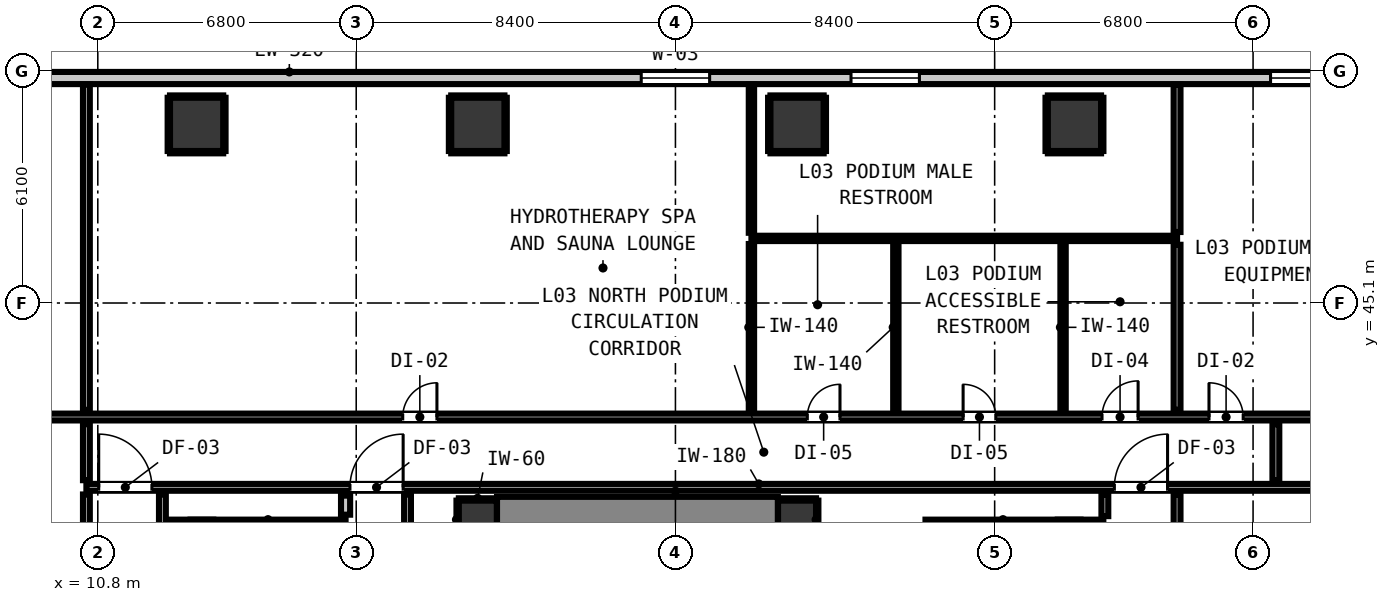
"""IFC4 building model, lengths in metres.
Left out: names, types, materials, properties, quantities, classifications, styles, units other than length and angle.
Written with IfcOpenShell. Run it as: python <this file> out.ifc"""

import sys

from ifc_helpers import new_model, si_unit, direction, frame, frame_2d, origin, origin_2d, place, context, subcontext, project, spatial, rectangle, extrude, element, fill, save


model = new_model("IFC4")
c1 = context("Model", 3, precision=1e-05, world=origin(), true_north=direction((0.0, 1.0)))
c2 = subcontext(c1, "Body", "Model", "MODEL_VIEW")
j1 = project(units=[si_unit("LENGTHUNIT", "METRE"), si_unit("PLANEANGLEUNIT", "RADIAN")], contexts=[c1])
p1 = place(None, origin())
s1 = spatial("IfcSite", under=j1, at=p1, CompositionType="ELEMENT")
p2 = place(p1, origin())
s2 = spatial("IfcBuilding", under=s1, at=p2, CompositionType="ELEMENT")
p3 = place(p2, frame((0.0, 0.0, 13.6)))
s3 = spatial("IfcBuildingStorey", under=s2, at=p3, CompositionType="ELEMENT", Elevation=13.6)
for number, where, z_axis, x_axis in (
    (1, (20.8, 39.4, 0.0), (0.0, 0.0, 1.0), (1.0, 0.0, 0.0)),
    (2, (29.2, 39.4, 0.0), (0.0, 0.0, 1.0), (1.0, 0.0, 0.0)),
):
    element("IfcColumn", number, at=place(p3, frame(where, z_axis=z_axis, x_axis=x_axis)), inside=s3, PredefinedType="COLUMN", context=c2, shape_type="SweptSolid", body=[
        extrude(rectangle(XDim=1.0, YDim=1.0, at=origin_2d()), origin(), (0.0, 0.0, 1.0), 4.2),
    ])
p4 = place(p3, frame((13.24, 31.205, 0.0), z_axis=(0.0, 0.0, 1.0), x_axis=(0.0, 1.0, 0.0)))
e3 = element("IfcWall", 3, at=p4, inside=s3, PredefinedType="SHEAR", context=c2, shape_type="SweptSolid", body=[
    extrude(rectangle(XDim=8.195, YDim=1.2, at=frame_2d((4.097, 0.0))), origin(), (0.0, 0.0, 1.0), 4.2),
])
p5 = place(p3, frame((13.24, 39.1, 0.0), z_axis=(0.0, 0.0, 1.0), x_axis=(1.0, 0.0, 0.0)))
e4 = element("IfcWall", 4, at=p5, inside=s3, PredefinedType="SHEAR", context=c2, shape_type="SweptSolid", body=[
    extrude(rectangle(XDim=4.08, YDim=0.6, at=frame_2d((2.04, 0.0))), origin(), (0.0, 0.0, 1.0), 4.2),
])
p6 = place(p3, frame((36.66, 31.205, 0.0), z_axis=(0.0, 0.0, 1.0), x_axis=(0.0, 1.0, 0.0)))
e5 = element("IfcWall", 5, at=p6, inside=s3, PredefinedType="SHEAR", context=c2, shape_type="SweptSolid", body=[
    extrude(rectangle(XDim=8.195, YDim=1.2, at=frame_2d((4.097, 0.0))), origin(), (0.0, 0.0, 1.0), 4.2),
])
p7 = place(p3, frame((32.58, 39.1, 0.0), z_axis=(0.0, 0.0, 1.0), x_axis=(1.0, 0.0, 0.0)))
e6 = element("IfcWall", 6, at=p7, inside=s3, PredefinedType="SHEAR", context=c2, shape_type="SweptSolid", body=[
    extrude(rectangle(XDim=4.08, YDim=0.6, at=frame_2d((2.04, 0.0))), origin(), (0.0, 0.0, 1.0), 4.2),
])
p8 = place(p3, frame((21.305, 39.4, 0.0), z_axis=(0.0, 0.0, 1.0), x_axis=(1.0, 0.0, 0.0)))
e7 = element("IfcWall", 7, at=p8, inside=s3, PredefinedType="SHEAR", context=c2, shape_type="SweptSolid", body=[
    extrude(rectangle(XDim=7.39, YDim=1.2, at=frame_2d((3.695, 0.0))), origin(), (0.0, 0.0, 1.0), 4.2),
])
for number, where, z_axis, x_axis in (
    (8, (13.4, 49.8, 0.0), (0.0, 0.0, 1.0), (1.0, 0.0, 0.0)),
    (9, (20.8, 49.8, 0.0), (0.0, 0.0, 1.0), (1.0, 0.0, 0.0)),
    (10, (29.2, 49.8, 0.0), (0.0, 0.0, 1.0), (1.0, 0.0, 0.0)),
    (11, (36.5, 49.8, 0.0), (0.0, 0.0, 1.0), (1.0, 0.0, 0.0)),
):
    element("IfcColumn", number, at=place(p3, frame(where, z_axis=z_axis, x_axis=x_axis)), inside=s3, PredefinedType="COLUMN", context=c2, shape_type="SweptSolid", body=[
        extrude(rectangle(XDim=1.4, YDim=1.4, at=origin_2d()), origin(), (0.0, 0.0, 1.0), 4.2),
    ])
p9 = place(p3, frame((6.68, 51.02, 0.0), z_axis=(0.0, 0.0, 1.0), x_axis=(1.0, 0.0, 0.0)))
e12 = element("IfcWall", 12, at=p9, inside=s3, PredefinedType="STANDARD", context=c2, shape_type="SweptSolid", body=[
    extrude(rectangle(XDim=38.64, YDim=0.32, at=frame_2d((19.32, 0.0))), origin(), (0.0, 0.0, 1.0), 3.78),
])
p10 = place(p9, frame((18.42, 0.0, 0.9)))
e13 = element("IfcOpeningElement", 13, at=p10, cuts=e12, PredefinedType="OPENING", context=c2, shape_type="SweptSolid", body=[
    extrude(rectangle(XDim=1.8, YDim=1.9, at=frame_2d((0.9, 0.95))), frame((0.0, 0.17, 0.0), z_axis=(0.0, -1.0, 0.0), x_axis=(1.0, 0.0, 0.0)), (0.0, 0.0, 1.0), 0.34),
])
p11 = place(p9, frame((23.94, 0.0, 0.9)))
e14 = element("IfcOpeningElement", 14, at=p11, cuts=e12, PredefinedType="OPENING", context=c2, shape_type="SweptSolid", body=[
    extrude(rectangle(XDim=1.8, YDim=1.9, at=frame_2d((0.9, 0.95))), frame((0.0, 0.17, 0.0), z_axis=(0.0, -1.0, 0.0), x_axis=(1.0, 0.0, 0.0)), (0.0, 0.0, 1.0), 0.34),
])
p12 = place(p9, frame((34.98, 0.0, 0.9)))
e15 = element("IfcOpeningElement", 15, at=p12, cuts=e12, PredefinedType="OPENING", context=c2, shape_type="SweptSolid", body=[
    extrude(rectangle(XDim=1.8, YDim=1.9, at=frame_2d((0.9, 0.95))), frame((0.0, 0.17, 0.0), z_axis=(0.0, -1.0, 0.0), x_axis=(1.0, 0.0, 0.0)), (0.0, 0.0, 1.0), 0.34),
])
p13 = place(p3, frame((10.5, 40.25, 0.0), z_axis=(0.0, 0.0, 1.0), x_axis=(1.0, 0.0, 0.0)))
e16 = element("IfcWall", 16, at=p13, inside=s3, PredefinedType="PARTITIONING", context=c2, shape_type="SweptSolid", body=[
    extrude(rectangle(XDim=37.2, YDim=0.18, at=frame_2d((18.6, 0.0))), origin(), (0.0, 0.0, 1.0), 3.78),
])
p14 = place(p13, frame((6.935, 0.0, 0.0)))
e17 = element("IfcOpeningElement", 17, at=p14, cuts=e16, PredefinedType="OPENING", context=c2, shape_type="SweptSolid", body=[
    extrude(rectangle(XDim=1.4, YDim=2.15, at=frame_2d((0.7, 1.075))), frame((0.0, 0.1, 0.0), z_axis=(0.0, -1.0, 0.0), x_axis=(1.0, 0.0, 0.0)), (0.0, 0.0, 1.0), 0.2),
])
p15 = place(p13, frame((0.324, 0.0, 0.0)))
e18 = element("IfcOpeningElement", 18, at=p15, cuts=e16, PredefinedType="OPENING", context=c2, shape_type="SweptSolid", body=[
    extrude(rectangle(XDim=1.4, YDim=2.15, at=frame_2d((0.7, 1.075))), frame((0.0, 0.1, 0.0), z_axis=(0.0, -1.0, 0.0), x_axis=(1.0, 0.0, 0.0)), (0.0, 0.0, 1.0), 0.2),
])
p16 = place(p13, frame((27.05, 0.0, 0.0)))
e19 = element("IfcOpeningElement", 19, at=p16, cuts=e16, PredefinedType="OPENING", context=c2, shape_type="SweptSolid", body=[
    extrude(rectangle(XDim=1.4, YDim=2.15, at=frame_2d((0.7, 1.075))), frame((0.0, 0.1, 0.0), z_axis=(0.0, -1.0, 0.0), x_axis=(1.0, 0.0, 0.0)), (0.0, 0.0, 1.0), 0.2),
])
p17 = place(p3, frame((4.352, 42.1, 0.0), z_axis=(0.0, 0.0, 1.0), x_axis=(1.0, 0.0, 0.0)))
e20 = element("IfcWall", 20, at=p17, inside=s3, PredefinedType="PARTITIONING", context=c2, shape_type="SweptSolid", body=[
    extrude(rectangle(XDim=43.296, YDim=0.18, at=frame_2d((21.648, 0.0))), origin(), (0.0, 0.0, 1.0), 3.78),
])
p18 = place(p17, frame((14.472, 0.0, 0.0)))
e21 = element("IfcOpeningElement", 21, at=p18, cuts=e20, PredefinedType="OPENING", context=c2, shape_type="SweptSolid", body=[
    extrude(rectangle(XDim=0.9, YDim=2.1, at=frame_2d((0.45, 1.05))), frame((0.0, 0.1, 0.0), z_axis=(0.0, -1.0, 0.0), x_axis=(1.0, 0.0, 0.0)), (0.0, 0.0, 1.0), 0.2),
])
p19 = place(p17, frame((25.118, 0.0, 0.0)))
e22 = element("IfcOpeningElement", 22, at=p19, cuts=e20, PredefinedType="OPENING", context=c2, shape_type="SweptSolid", body=[
    extrude(rectangle(XDim=0.86, YDim=2.02, at=frame_2d((0.43, 1.01))), frame((0.0, 0.1, 0.0), z_axis=(0.0, -1.0, 0.0), x_axis=(1.0, 0.0, 0.0)), (0.0, 0.0, 1.0), 0.2),
])
p20 = place(p17, frame((29.218, 0.0, 0.0)))
e23 = element("IfcOpeningElement", 23, at=p20, cuts=e20, PredefinedType="OPENING", context=c2, shape_type="SweptSolid", body=[
    extrude(rectangle(XDim=0.86, YDim=2.02, at=frame_2d((0.43, 1.01))), frame((0.0, 0.1, 0.0), z_axis=(0.0, -1.0, 0.0), x_axis=(1.0, 0.0, 0.0)), (0.0, 0.0, 1.0), 0.2),
])
p21 = place(p17, frame((32.873, 0.0, 0.0)))
e24 = element("IfcOpeningElement", 24, at=p21, cuts=e20, PredefinedType="OPENING", context=c2, shape_type="SweptSolid", body=[
    extrude(rectangle(XDim=0.95, YDim=2.1, at=frame_2d((0.475, 1.05))), frame((0.0, 0.1, 0.0), z_axis=(0.0, -1.0, 0.0), x_axis=(1.0, 0.0, 0.0)), (0.0, 0.0, 1.0), 0.2),
])
p22 = place(p17, frame((35.688, 0.0, 0.0)))
e25 = element("IfcOpeningElement", 25, at=p22, cuts=e20, PredefinedType="OPENING", context=c2, shape_type="SweptSolid", body=[
    extrude(rectangle(XDim=0.9, YDim=2.1, at=frame_2d((0.45, 1.05))), frame((0.0, 0.1, 0.0), z_axis=(0.0, -1.0, 0.0), x_axis=(1.0, 0.0, 0.0)), (0.0, 0.0, 1.0), 0.2),
])
p23 = place(p3, frame((28.0, 46.8, 0.0), z_axis=(0.0, 0.0, 1.0), x_axis=(1.0, 0.0, 0.0)))
e26 = element("IfcWall", 26, at=p23, inside=s3, PredefinedType="PARTITIONING", context=c2, shape_type="SweptSolid", body=[
    extrude(rectangle(XDim=11.2, YDim=0.14, at=frame_2d((5.6, 0.0))), origin(), (0.0, 0.0, 1.0), 3.78),
])
p24 = place(p3, frame((17.32, 39.53, 0.0), z_axis=(0.0, 0.0, 1.0), x_axis=(0.0, 1.0, 0.0)))
e27 = element("IfcWall", 27, at=p24, inside=s3, PredefinedType="PARTITIONING", context=c2, shape_type="SweptSolid", body=[
    extrude(rectangle(XDim=0.502, YDim=0.24, at=frame_2d((0.251, 0.0))), origin(), (0.0, 0.0, 1.0), 3.78),
])
p25 = place(p3, frame((10.5, 21.368, 0.0), z_axis=(0.0, 0.0, 1.0), x_axis=(0.0, 1.0, 0.0)))
e28 = element("IfcWall", 28, at=p25, inside=s3, PredefinedType="PARTITIONING", context=c2, shape_type="SweptSolid", body=[
    extrude(rectangle(XDim=18.694, YDim=0.18, at=frame_2d((9.347, 0.0))), origin(), (0.0, 0.0, 1.0), 3.78),
])
p26 = place(p3, frame((10.5, 40.438, 0.0), z_axis=(0.0, 0.0, 1.0), x_axis=(0.0, 1.0, 0.0)))
e29 = element("IfcWall", 29, at=p26, inside=s3, PredefinedType="PARTITIONING", context=c2, shape_type="SweptSolid", body=[
    extrude(rectangle(XDim=1.474, YDim=0.18, at=frame_2d((0.737, 0.0))), origin(), (0.0, 0.0, 1.0), 3.78),
])
p27 = place(p3, frame((10.5, 42.288, 0.0), z_axis=(0.0, 0.0, 1.0), x_axis=(0.0, 1.0, 0.0)))
e30 = element("IfcWall", 30, at=p27, inside=s3, PredefinedType="PARTITIONING", context=c2, shape_type="SweptSolid", body=[
    extrude(rectangle(XDim=8.56, YDim=0.18, at=frame_2d((4.28, 0.0))), origin(), (0.0, 0.0, 1.0), 3.78),
])
p28 = place(p3, frame((12.5, 21.368, 0.0), z_axis=(0.0, 0.0, 1.0), x_axis=(0.0, 1.0, 0.0)))
e31 = element("IfcWall", 31, at=p28, inside=s3, PredefinedType="PARTITIONING", context=c2, shape_type="SweptSolid", body=[
    extrude(rectangle(XDim=18.694, YDim=0.18, at=frame_2d((9.347, 0.0))), origin(), (0.0, 0.0, 1.0), 3.78),
])
p29 = place(p3, frame((18.95, 38.918, 0.0), z_axis=(0.0, 0.0, 1.0), x_axis=(0.0, 1.0, 0.0)))
e32 = element("IfcWall", 32, at=p29, inside=s3, PredefinedType="PARTITIONING", context=c2, shape_type="SweptSolid", body=[
    extrude(rectangle(XDim=1.144, YDim=0.18, at=frame_2d((0.572, 0.0))), origin(), (0.0, 0.0, 1.0), 3.78),
])
p30 = place(p3, frame((37.3, 39.492, 0.0), z_axis=(0.0, 0.0, 1.0), x_axis=(0.0, 1.0, 0.0)))
e33 = element("IfcWall", 33, at=p30, inside=s3, PredefinedType="PARTITIONING", context=c2, shape_type="SweptSolid", body=[
    extrude(rectangle(XDim=0.57, YDim=0.18, at=frame_2d((0.285, 0.0))), origin(), (0.0, 0.0, 1.0), 3.78),
])
p31 = place(p3, frame((39.2, 21.368, 0.0), z_axis=(0.0, 0.0, 1.0), x_axis=(0.0, 1.0, 0.0)))
e34 = element("IfcWall", 34, at=p31, inside=s3, PredefinedType="PARTITIONING", context=c2, shape_type="SweptSolid", body=[
    extrude(rectangle(XDim=18.694, YDim=0.18, at=frame_2d((9.347, 0.0))), origin(), (0.0, 0.0, 1.0), 3.78),
])
p32 = place(p3, frame((39.2, 42.288, 0.0), z_axis=(0.0, 0.0, 1.0), x_axis=(0.0, 1.0, 0.0)))
e35 = element("IfcWall", 35, at=p32, inside=s3, PredefinedType="PARTITIONING", context=c2, shape_type="SweptSolid", body=[
    extrude(rectangle(XDim=4.344, YDim=0.18, at=frame_2d((2.172, 0.0))), origin(), (0.0, 0.0, 1.0), 3.78),
])
p33 = place(p3, frame((39.2, 46.968, 0.0), z_axis=(0.0, 0.0, 1.0), x_axis=(0.0, 1.0, 0.0)))
e36 = element("IfcWall", 36, at=p33, inside=s3, PredefinedType="PARTITIONING", context=c2, shape_type="SweptSolid", body=[
    extrude(rectangle(XDim=3.88, YDim=0.18, at=frame_2d((1.94, 0.0))), origin(), (0.0, 0.0, 1.0), 3.78),
])
p34 = place(p3, frame((41.8, 40.438, 0.0), z_axis=(0.0, 0.0, 1.0), x_axis=(0.0, 1.0, 0.0)))
e37 = element("IfcWall", 37, at=p34, inside=s3, PredefinedType="PARTITIONING", context=c2, shape_type="SweptSolid", body=[
    extrude(rectangle(XDim=1.474, YDim=0.18, at=frame_2d((0.737, 0.0))), origin(), (0.0, 0.0, 1.0), 3.78),
])
p35 = place(p3, frame((28.0, 42.268, 0.0), z_axis=(0.0, 0.0, 1.0), x_axis=(0.0, 1.0, 0.0)))
e38 = element("IfcWall", 38, at=p35, inside=s3, PredefinedType="PARTITIONING", context=c2, shape_type="SweptSolid", body=[
    extrude(rectangle(XDim=4.384, YDim=0.14, at=frame_2d((2.192, 0.0))), origin(), (0.0, 0.0, 1.0), 3.78),
])
p36 = place(p3, frame((28.0, 46.948, 0.0), z_axis=(0.0, 0.0, 1.0), x_axis=(0.0, 1.0, 0.0)))
e39 = element("IfcWall", 39, at=p36, inside=s3, PredefinedType="PARTITIONING", context=c2, shape_type="SweptSolid", body=[
    extrude(rectangle(XDim=3.9, YDim=0.14, at=frame_2d((1.95, 0.0))), origin(), (0.0, 0.0, 1.0), 3.78),
])
for number, where, z_axis, x_axis in (
    (40, (31.8, 42.268, 0.0), (0.0, 0.0, 1.0), (0.0, 1.0, 0.0)),
    (41, (36.2, 42.268, 0.0), (0.0, 0.0, 1.0), (0.0, 1.0, 0.0)),
):
    element("IfcWall", number, at=place(p3, frame(where, z_axis=z_axis, x_axis=x_axis)), inside=s3, PredefinedType="PARTITIONING", context=c2, shape_type="SweptSolid", body=[
        extrude(rectangle(XDim=4.384, YDim=0.14, at=frame_2d((2.192, 0.0))), origin(), (0.0, 0.0, 1.0), 3.78),
    ])
p37 = place(p3, frame((20.3, 39.932, 0.0), z_axis=(0.0, 0.0, 1.0), x_axis=(1.0, 0.0, 0.0)))
e42 = element("IfcWall", 42, at=p37, inside=s3, PredefinedType="PARTITIONING", context=c2, shape_type="SweptSolid", body=[
    extrude(rectangle(XDim=0.99, YDim=0.06, at=frame_2d((0.495, 0.0))), origin(), (0.0, 0.0, 1.0), 1.45),
])
p38 = place(p3, frame((20.268, 38.9, 0.0), z_axis=(0.0, 0.0, 1.0), x_axis=(0.0, 1.0, 0.0)))
e43 = element("IfcWall", 43, at=p38, inside=s3, PredefinedType="PARTITIONING", context=c2, shape_type="SweptSolid", body=[
    extrude(rectangle(XDim=1.0, YDim=0.06, at=frame_2d((0.5, 0.0))), origin(), (0.0, 0.0, 1.0), 1.45),
])
p39 = place(p3, frame((28.71, 39.932, 0.0), z_axis=(0.0, 0.0, 1.0), x_axis=(1.0, 0.0, 0.0)))
e44 = element("IfcWall", 44, at=p39, inside=s3, PredefinedType="PARTITIONING", context=c2, shape_type="SweptSolid", body=[
    extrude(rectangle(XDim=0.99, YDim=0.06, at=frame_2d((0.495, 0.0))), origin(), (0.0, 0.0, 1.0), 1.45),
])
p40 = place(p3, frame((29.732, 38.9, 0.0), z_axis=(0.0, 0.0, 1.0), x_axis=(0.0, 1.0, 0.0)))
e45 = element("IfcWall", 45, at=p40, inside=s3, PredefinedType="PARTITIONING", context=c2, shape_type="SweptSolid", body=[
    extrude(rectangle(XDim=1.0, YDim=0.06, at=frame_2d((0.5, 0.0))), origin(), (0.0, 0.0, 1.0), 1.45),
])
for number, where, z_axis, x_axis in (
    (46, (12.7, 49.068, 0.0), (0.0, 0.0, 1.0), (1.0, 0.0, 0.0)),
    (47, (12.7, 50.532, 0.0), (0.0, 0.0, 1.0), (1.0, 0.0, 0.0)),
):
    element("IfcWall", number, at=place(p3, frame(where, z_axis=z_axis, x_axis=x_axis)), inside=s3, PredefinedType="PARTITIONING", context=c2, shape_type="SweptSolid", body=[
        extrude(rectangle(XDim=1.4, YDim=0.06, at=frame_2d((0.7, 0.0))), origin(), (0.0, 0.0, 1.0), 1.45),
    ])
for number, where, z_axis, x_axis in (
    (48, (12.668, 49.1, 0.0), (0.0, 0.0, 1.0), (0.0, 1.0, 0.0)),
    (49, (14.132, 49.1, 0.0), (0.0, 0.0, 1.0), (0.0, 1.0, 0.0)),
    (50, (20.1, 49.068, 0.0), (0.0, 0.0, 1.0), (1.0, 0.0, 0.0)),
    (51, (20.1, 50.532, 0.0), (0.0, 0.0, 1.0), (1.0, 0.0, 0.0)),
    (52, (20.068, 49.1, 0.0), (0.0, 0.0, 1.0), (0.0, 1.0, 0.0)),
    (53, (21.532, 49.1, 0.0), (0.0, 0.0, 1.0), (0.0, 1.0, 0.0)),
    (54, (28.5, 49.068, 0.0), (0.0, 0.0, 1.0), (1.0, 0.0, 0.0)),
    (55, (28.5, 50.532, 0.0), (0.0, 0.0, 1.0), (1.0, 0.0, 0.0)),
    (56, (28.468, 49.1, 0.0), (0.0, 0.0, 1.0), (0.0, 1.0, 0.0)),
    (57, (29.932, 49.1, 0.0), (0.0, 0.0, 1.0), (0.0, 1.0, 0.0)),
    (58, (35.8, 49.068, 0.0), (0.0, 0.0, 1.0), (1.0, 0.0, 0.0)),
    (59, (35.8, 50.532, 0.0), (0.0, 0.0, 1.0), (1.0, 0.0, 0.0)),
    (60, (35.768, 49.1, 0.0), (0.0, 0.0, 1.0), (0.0, 1.0, 0.0)),
    (61, (37.232, 49.1, 0.0), (0.0, 0.0, 1.0), (0.0, 1.0, 0.0)),
):
    element("IfcWall", number, at=place(p3, frame(where, z_axis=z_axis, x_axis=x_axis)), inside=s3, PredefinedType="PARTITIONING", context=c2, shape_type="SweptSolid", body=[
        extrude(rectangle(XDim=1.4, YDim=0.06, at=frame_2d((0.7, 0.0))), origin(), (0.0, 0.0, 1.0), 1.45),
    ])
p41 = place(p10, origin())
e62 = element("IfcWindow", 62, at=p41, inside=s3, PartitioningType="SINGLE_PANEL", PredefinedType="WINDOW", context=c2, shape_type="SweptSolid", body=[
    extrude(rectangle(XDim=1.8, YDim=1.9, at=frame_2d((0.9, 0.95))), frame((0.0, 0.03, 0.0), z_axis=(0.0, -1.0, 0.0), x_axis=(1.0, 0.0, 0.0)), (0.0, 0.0, 1.0), 0.06),
])
fill(e13, e62)
p42 = place(p11, origin())
e63 = element("IfcWindow", 63, at=p42, inside=s3, PartitioningType="SINGLE_PANEL", PredefinedType="WINDOW", context=c2, shape_type="SweptSolid", body=[
    extrude(rectangle(XDim=1.8, YDim=1.9, at=frame_2d((0.9, 0.95))), frame((0.0, 0.03, 0.0), z_axis=(0.0, -1.0, 0.0), x_axis=(1.0, 0.0, 0.0)), (0.0, 0.0, 1.0), 0.06),
])
fill(e14, e63)
p43 = place(p12, origin())
e64 = element("IfcWindow", 64, at=p43, inside=s3, PartitioningType="SINGLE_PANEL", PredefinedType="WINDOW", context=c2, shape_type="SweptSolid", body=[
    extrude(rectangle(XDim=1.8, YDim=1.9, at=frame_2d((0.9, 0.95))), frame((0.0, 0.03, 0.0), z_axis=(0.0, -1.0, 0.0), x_axis=(1.0, 0.0, 0.0)), (0.0, 0.0, 1.0), 0.06),
])
fill(e15, e64)
p44 = place(p14, origin())
e65 = element("IfcDoor", 65, at=p44, inside=s3, OperationType="SINGLE_SWING_RIGHT", PredefinedType="DOOR", context=c2, shape_type="SweptSolid", body=[
    extrude(rectangle(XDim=1.4, YDim=2.15, at=frame_2d((0.7, 1.075))), frame((0.0, 0.025, 0.0), z_axis=(0.0, -1.0, 0.0), x_axis=(1.0, 0.0, 0.0)), (0.0, 0.0, 1.0), 0.05),
])
fill(e17, e65)
p45 = place(p15, origin())
e66 = element("IfcDoor", 66, at=p45, inside=s3, OperationType="SINGLE_SWING_LEFT", PredefinedType="DOOR", context=c2, shape_type="SweptSolid", body=[
    extrude(rectangle(XDim=1.4, YDim=2.15, at=frame_2d((0.7, 1.075))), frame((0.0, 0.025, 0.0), z_axis=(0.0, -1.0, 0.0), x_axis=(1.0, 0.0, 0.0)), (0.0, 0.0, 1.0), 0.05),
])
fill(e18, e66)
p46 = place(p16, origin())
e67 = element("IfcDoor", 67, at=p46, inside=s3, OperationType="SINGLE_SWING_RIGHT", PredefinedType="DOOR", context=c2, shape_type="SweptSolid", body=[
    extrude(rectangle(XDim=1.4, YDim=2.15, at=frame_2d((0.7, 1.075))), frame((0.0, 0.025, 0.0), z_axis=(0.0, -1.0, 0.0), x_axis=(1.0, 0.0, 0.0)), (0.0, 0.0, 1.0), 0.05),
])
fill(e19, e67)
p47 = place(p18, origin())
e68 = element("IfcDoor", 68, at=p47, inside=s3, OperationType="SINGLE_SWING_RIGHT", PredefinedType="DOOR", context=c2, shape_type="SweptSolid", body=[
    extrude(rectangle(XDim=0.9, YDim=2.1, at=frame_2d((0.45, 1.05))), frame((0.0, 0.025, 0.0), z_axis=(0.0, -1.0, 0.0), x_axis=(1.0, 0.0, 0.0)), (0.0, 0.0, 1.0), 0.05),
])
fill(e21, e68)
p48 = place(p19, origin())
e69 = element("IfcDoor", 69, at=p48, inside=s3, OperationType="SINGLE_SWING_RIGHT", PredefinedType="DOOR", context=c2, shape_type="SweptSolid", body=[
    extrude(rectangle(XDim=0.86, YDim=2.02, at=frame_2d((0.43, 1.01))), frame((0.0, 0.025, 0.0), z_axis=(0.0, -1.0, 0.0), x_axis=(1.0, 0.0, 0.0)), (0.0, 0.0, 1.0), 0.05),
])
fill(e22, e69)
p49 = place(p20, origin())
e70 = element("IfcDoor", 70, at=p49, inside=s3, OperationType="SINGLE_SWING_LEFT", PredefinedType="DOOR", context=c2, shape_type="SweptSolid", body=[
    extrude(rectangle(XDim=0.86, YDim=2.02, at=frame_2d((0.43, 1.01))), frame((0.0, 0.025, 0.0), z_axis=(0.0, -1.0, 0.0), x_axis=(1.0, 0.0, 0.0)), (0.0, 0.0, 1.0), 0.05),
])
fill(e23, e70)
p50 = place(p21, origin())
e71 = element("IfcDoor", 71, at=p50, inside=s3, OperationType="SINGLE_SWING_RIGHT", PredefinedType="DOOR", context=c2, shape_type="SweptSolid", body=[
    extrude(rectangle(XDim=0.95, YDim=2.1, at=frame_2d((0.475, 1.05))), frame((0.0, 0.025, 0.0), z_axis=(0.0, -1.0, 0.0), x_axis=(1.0, 0.0, 0.0)), (0.0, 0.0, 1.0), 0.05),
])
fill(e24, e71)
p51 = place(p22, origin())
e72 = element("IfcDoor", 72, at=p51, inside=s3, OperationType="SINGLE_SWING_LEFT", PredefinedType="DOOR", context=c2, shape_type="SweptSolid", body=[
    extrude(rectangle(XDim=0.9, YDim=2.1, at=frame_2d((0.45, 1.05))), frame((0.0, 0.025, 0.0), z_axis=(0.0, -1.0, 0.0), x_axis=(1.0, 0.0, 0.0)), (0.0, 0.0, 1.0), 0.05),
])
fill(e25, e72)
save(model, sys.argv[1])
